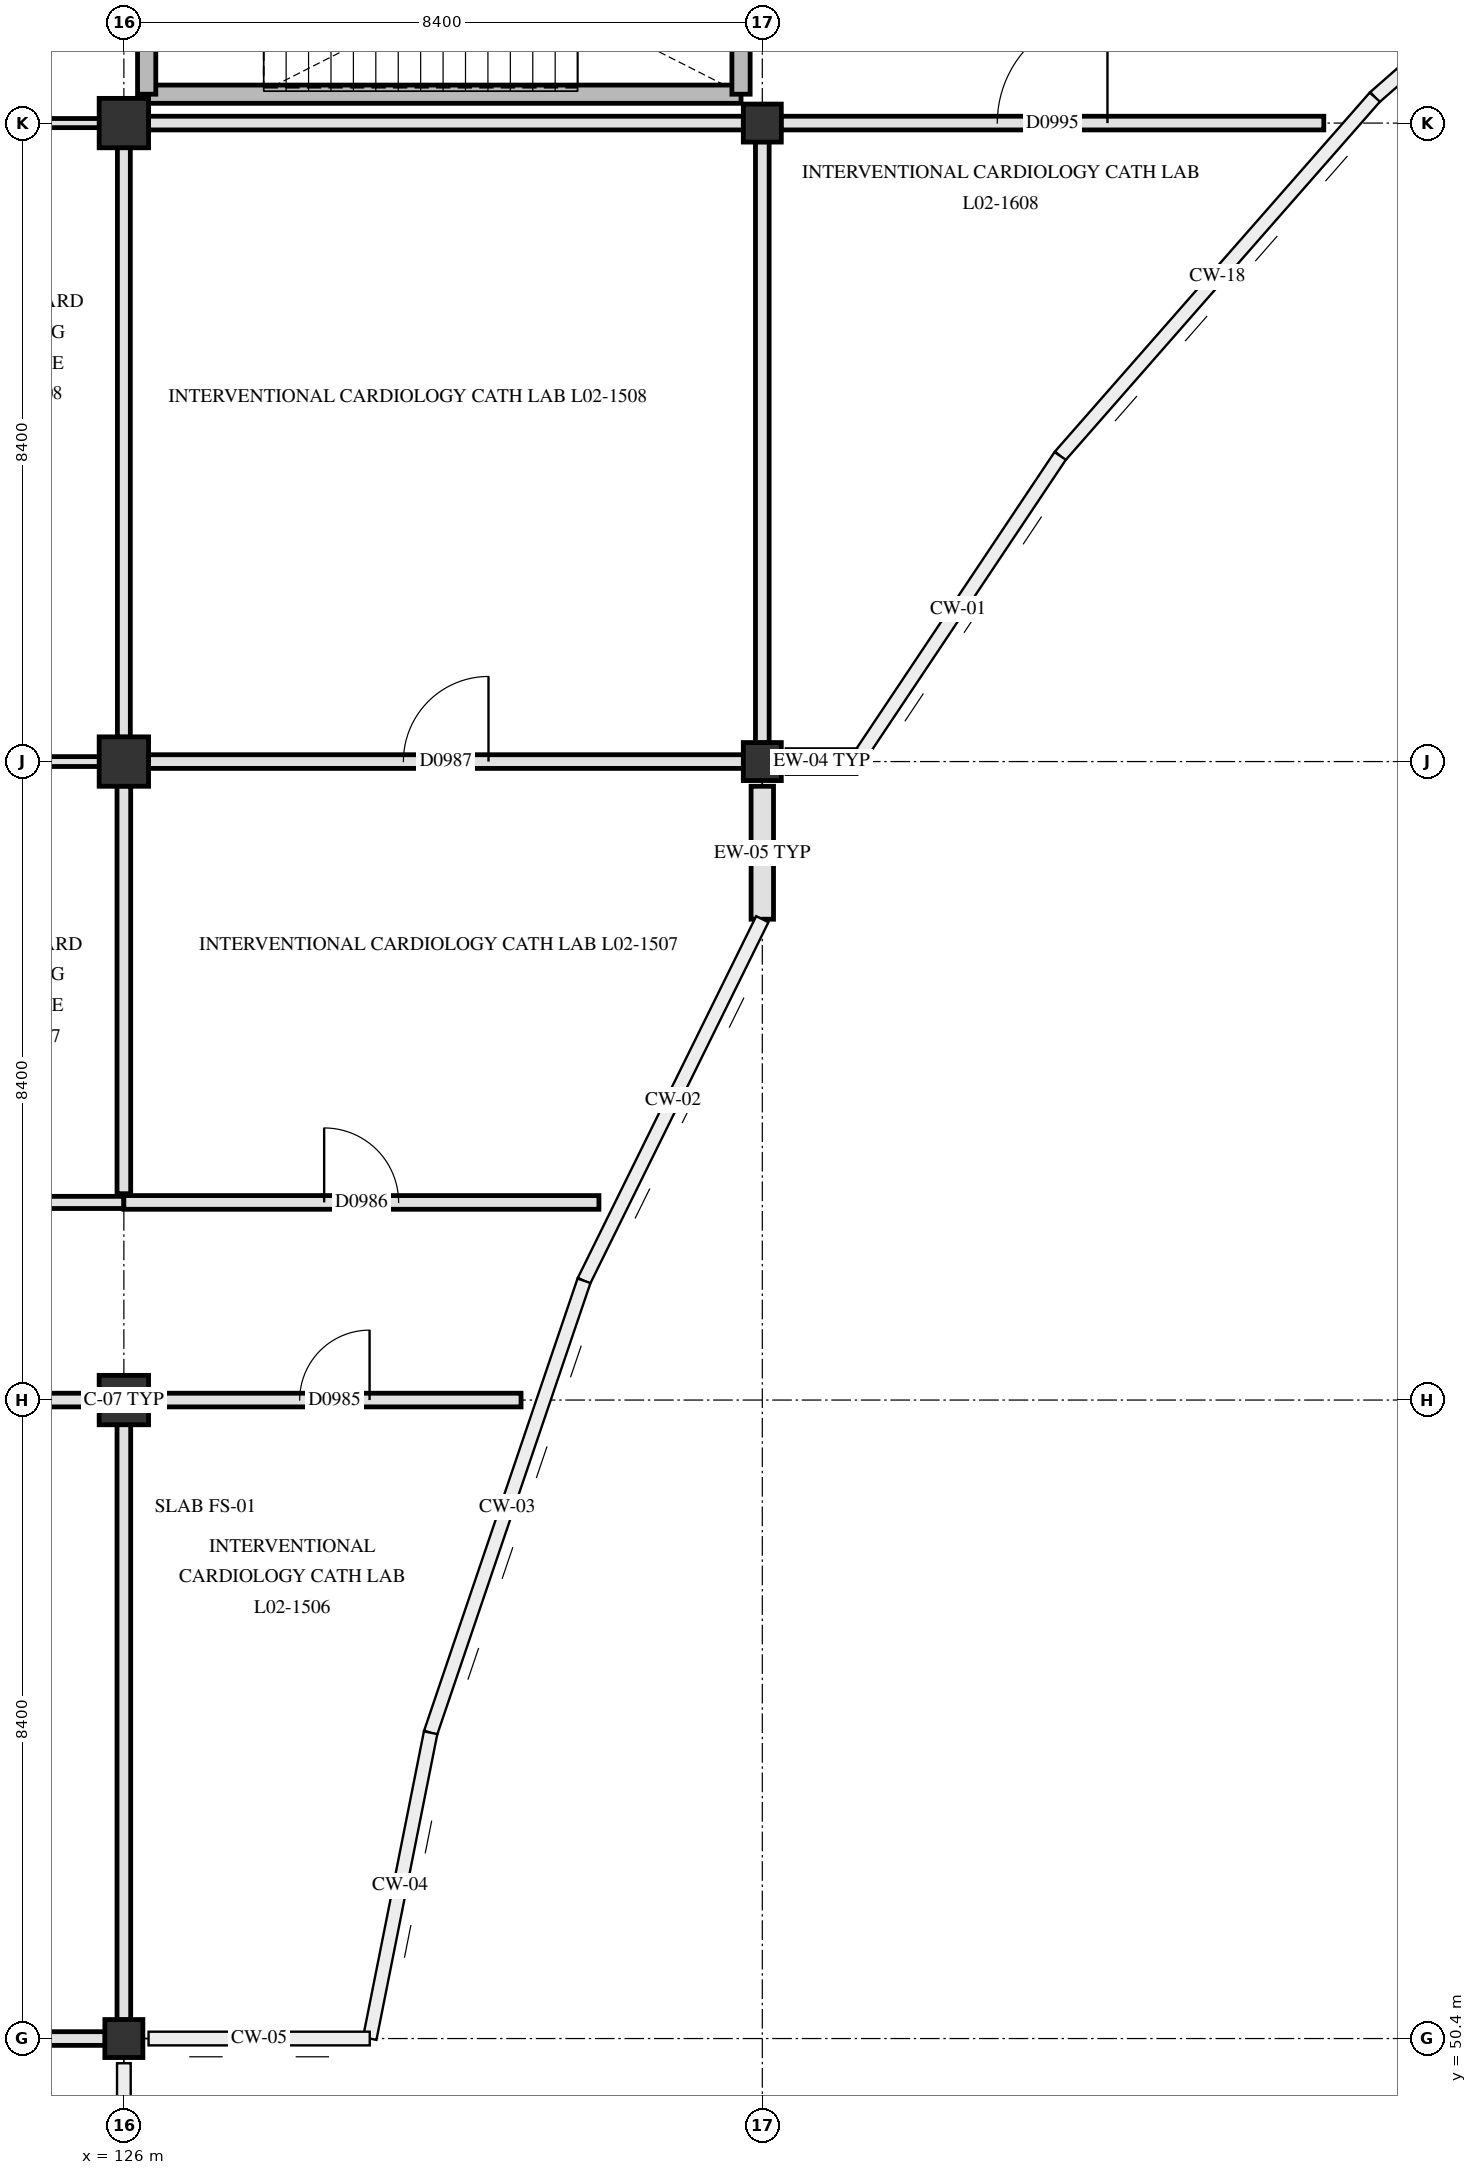
"""IFC4 building model, lengths in metres.
Left out: names, types, materials, properties, quantities, classifications, styles, units other than length and angle.
Written with IfcOpenShell. Run it as: python <this file> out.ifc"""

import sys

from ifc_helpers import new_model, si_unit, direction, frame, frame_2d, origin, origin_2d, place, context, subcontext, project, spatial, rectangle, circle, extrude, element, fill, save


model = new_model("IFC4")
c1 = context("Model", 3, precision=1e-05, world=origin(), true_north=direction((0.0, 1.0)))
c2 = subcontext(c1, "Body", "Model", "MODEL_VIEW")
j1 = project(units=[si_unit("LENGTHUNIT", "METRE"), si_unit("PLANEANGLEUNIT", "RADIAN")], contexts=[c1])
p1 = place(None, origin())
s1 = spatial("IfcSite", under=j1, at=p1, CompositionType="ELEMENT")
p2 = place(p1, origin())
s2 = spatial("IfcBuilding", under=s1, at=p2, CompositionType="ELEMENT")
p3 = place(p2, frame((0.0, 0.0, 9.3)))
s3 = spatial("IfcBuildingStorey", under=s2, at=p3, CompositionType="ELEMENT", Elevation=9.3)
p4 = place(p3, frame((126.0, 50.4, 0.0), z_axis=(0.0, 0.0, 1.0), x_axis=(1.0, 0.0, 0.0)))
e1 = element("IfcColumn", 1, at=p4, inside=s3, PredefinedType="COLUMN", context=c2, shape_type="SweptSolid", body=[
    extrude(rectangle(XDim=0.5, YDim=0.5, at=origin_2d()), origin(), (0.0, 0.0, 1.0), 5.1),
])
for number, where, z_axis, x_axis in (
    (2, (126.0, 58.8, 0.0), (0.0, 0.0, 1.0), (1.0, 0.0, 0.0)),
    (3, (126.0, 67.2, 0.0), (0.0, 0.0, 1.0), (1.0, 0.0, 0.0)),
    (4, (126.0, 75.6, 0.0), (0.0, 0.0, 1.0), (1.0, 0.0, 0.0)),
):
    element("IfcColumn", number, at=place(p3, frame(where, z_axis=z_axis, x_axis=x_axis)), inside=s3, PredefinedType="COLUMN", context=c2, shape_type="SweptSolid", body=[
        extrude(circle(Radius=0.325, at=origin_2d()), origin(), (0.0, 0.0, 1.0), 5.1),
    ])
for number, where, z_axis, x_axis in (
    (5, (134.4, 67.2, 0.0), (0.0, 0.0, 1.0), (1.0, 0.0, 0.0)),
    (6, (134.4, 75.6, 0.0), (0.0, 0.0, 1.0), (1.0, 0.0, 0.0)),
):
    element("IfcColumn", number, at=place(p3, frame(where, z_axis=z_axis, x_axis=x_axis)), inside=s3, PredefinedType="COLUMN", context=c2, shape_type="SweptSolid", body=[
        extrude(rectangle(XDim=0.5, YDim=0.5, at=origin_2d()), origin(), (0.0, 0.0, 1.0), 5.1),
    ])
p5 = place(p3, frame((135.633, 67.2, 0.0), z_axis=(0.0, 0.0, 1.0), x_axis=(-1.0, 0.0, 0.0)))
e7 = element("IfcWall", 7, at=p5, inside=s3, PredefinedType="SOLIDWALL", context=c2, shape_type="SweptSolid", body=[
    extrude(rectangle(XDim=0.908, YDim=0.315, at=frame_2d((0.454, 0.0))), origin(), (0.0, 0.0, 1.0), 4.77),
])
p6 = place(p3, frame((134.4, 66.875, 0.0), z_axis=(0.0, 0.0, 1.0), x_axis=(0.0, -1.0, 0.0)))
e8 = element("IfcWall", 8, at=p6, inside=s3, PredefinedType="SOLIDWALL", context=c2, shape_type="SweptSolid", body=[
    extrude(rectangle(XDim=1.749, YDim=0.295, at=frame_2d((0.875, 0.0))), origin(), (0.0, 0.0, 1.0), 4.77),
])
p7 = place(p3, frame((126.3, 75.98, 0.0), z_axis=(0.0, 0.0, 1.0), x_axis=(1.0, 0.0, 0.0)))
e9 = element("IfcWall", 9, at=p7, inside=s3, PredefinedType="SHEAR", context=c2, shape_type="SweptSolid", body=[
    extrude(rectangle(XDim=7.82, YDim=0.24, at=frame_2d((3.91, 0.0))), origin(), (0.0, 0.0, 1.0), 4.78),
])
for number, where, z_axis, x_axis in (
    (10, (126.3, 75.98, 0.0), (0.0, 0.0, 1.0), (0.0, 1.0, 0.0)),
    (11, (134.12, 75.98, 0.0), (0.0, 0.0, 1.0), (0.0, 1.0, 0.0)),
):
    element("IfcWall", number, at=place(p3, frame(where, z_axis=z_axis, x_axis=x_axis)), inside=s3, PredefinedType="SHEAR", context=c2, shape_type="SweptSolid", body=[
        extrude(rectangle(XDim=3.32, YDim=0.24, at=frame_2d((1.66, 0.0))), origin(), (0.0, 0.0, 1.0), 4.78),
    ])
p8 = place(p3, frame((117.945, 50.4, 0.0), z_axis=(0.0, 0.0, 1.0), x_axis=(1.0, 0.0, 0.0)))
e12 = element("IfcWall", 12, at=p8, inside=s3, PredefinedType="PARTITIONING", context=c2, shape_type="SweptSolid", body=[
    extrude(rectangle(XDim=7.81, YDim=0.18, at=frame_2d((3.905, 0.0))), origin(), (0.0, 0.0, 1.0), 4.17),
])
p9 = place(p3, frame((117.92, 58.8, 0.0), z_axis=(0.0, 0.0, 1.0), x_axis=(1.0, 0.0, 0.0)))
e13 = element("IfcWall", 13, at=p9, inside=s3, PredefinedType="PARTITIONING", context=c2, shape_type="SweptSolid", body=[
    extrude(rectangle(XDim=7.76, YDim=0.18, at=frame_2d((3.88, 0.0))), origin(), (0.0, 0.0, 1.0), 4.17),
])
p10 = place(p9, frame((3.255, 0.0, 0.0)))
e14 = element("IfcOpeningElement", 14, at=p10, cuts=e13, PredefinedType="OPENING", context=c2, shape_type="SweptSolid", body=[
    extrude(rectangle(XDim=1.25, YDim=2.2, at=frame_2d((0.625, 1.1))), frame((0.0, 0.1, 0.0), z_axis=(0.0, -1.0, 0.0), x_axis=(1.0, 0.0, 0.0)), (0.0, 0.0, 1.0), 0.2),
])
p11 = place(p3, frame((126.32, 58.8, 0.0), z_axis=(0.0, 0.0, 1.0), x_axis=(1.0, 0.0, 0.0)))
e15 = element("IfcWall", 15, at=p11, inside=s3, PredefinedType="PARTITIONING", context=c2, shape_type="SweptSolid", body=[
    extrude(rectangle(XDim=4.906, YDim=0.18, at=frame_2d((2.453, 0.0))), origin(), (0.0, 0.0, 1.0), 4.77),
])
p12 = place(p11, frame((1.993, 0.0, 0.0)))
e16 = element("IfcOpeningElement", 16, at=p12, cuts=e15, PredefinedType="OPENING", context=c2, shape_type="SweptSolid", body=[
    extrude(rectangle(XDim=0.92, YDim=2.08, at=frame_2d((0.46, 1.04))), frame((0.0, 0.1, 0.0), z_axis=(0.0, -1.0, 0.0), x_axis=(1.0, 0.0, 0.0)), (0.0, 0.0, 1.0), 0.2),
])
p13 = place(p3, frame((121.075, 61.4, 0.0), z_axis=(0.0, 0.0, 1.0), x_axis=(1.0, 0.0, 0.0)))
e17 = element("IfcWall", 17, at=p13, inside=s3, PredefinedType="PARTITIONING", context=c2, shape_type="SweptSolid", body=[
    extrude(rectangle(XDim=4.925, YDim=0.16, at=frame_2d((2.462, 0.0))), origin(), (0.0, 0.0, 1.0), 4.17),
])
p14 = place(p13, frame((1.812, 0.0, 0.0)))
e18 = element("IfcOpeningElement", 18, at=p14, cuts=e17, PredefinedType="OPENING", context=c2, shape_type="SweptSolid", body=[
    extrude(rectangle(XDim=1.3, YDim=2.2, at=frame_2d((0.65, 1.1))), frame((0.0, 0.09, 0.0), z_axis=(0.0, -1.0, 0.0), x_axis=(1.0, 0.0, 0.0)), (0.0, 0.0, 1.0), 0.18),
])
p15 = place(p3, frame((126.0, 61.4, 0.0), z_axis=(0.0, 0.0, 1.0), x_axis=(1.0, 0.0, 0.0)))
e19 = element("IfcWall", 19, at=p15, inside=s3, PredefinedType="PARTITIONING", context=c2, shape_type="SweptSolid", body=[
    extrude(rectangle(XDim=6.25, YDim=0.18, at=frame_2d((3.125, 0.0))), origin(), (0.0, 0.0, 1.0), 4.17),
])
p16 = place(p15, frame((2.635, 0.0, 0.0)))
e20 = element("IfcOpeningElement", 20, at=p16, cuts=e19, PredefinedType="OPENING", context=c2, shape_type="SweptSolid", body=[
    extrude(rectangle(XDim=0.98, YDim=2.12, at=frame_2d((0.49, 1.06))), frame((0.0, 0.1, 0.0), z_axis=(0.0, -1.0, 0.0), x_axis=(1.0, 0.0, 0.0)), (0.0, 0.0, 1.0), 0.2),
])
p17 = place(p3, frame((124.1, 67.2, 0.0), z_axis=(0.0, 0.0, 1.0), x_axis=(1.0, 0.0, 0.0)))
e21 = element("IfcWall", 21, at=p17, inside=s3, PredefinedType="PARTITIONING", context=c2, shape_type="SweptSolid", body=[
    extrude(rectangle(XDim=1.58, YDim=0.13, at=frame_2d((0.79, 0.0))), origin(), (0.0, 0.0, 1.0), 4.77),
])
p18 = place(p3, frame((126.32, 67.2, 0.0), z_axis=(0.0, 0.0, 1.0), x_axis=(1.0, 0.0, 0.0)))
e22 = element("IfcWall", 22, at=p18, inside=s3, PredefinedType="PARTITIONING", context=c2, shape_type="SweptSolid", body=[
    extrude(rectangle(XDim=7.835, YDim=0.18, at=frame_2d((3.917, 0.0))), origin(), (0.0, 0.0, 1.0), 4.17),
])
p19 = place(p18, frame((3.357, 0.0, 0.0)))
e23 = element("IfcOpeningElement", 23, at=p19, cuts=e22, PredefinedType="OPENING", context=c2, shape_type="SweptSolid", body=[
    extrude(rectangle(XDim=1.12, YDim=2.18, at=frame_2d((0.56, 1.09))), frame((0.0, 0.1, 0.0), z_axis=(0.0, -1.0, 0.0), x_axis=(1.0, 0.0, 0.0)), (0.0, 0.0, 1.0), 0.2),
])
p20 = place(p3, frame((117.92, 75.6, 0.0), z_axis=(0.0, 0.0, 1.0), x_axis=(1.0, 0.0, 0.0)))
e24 = element("IfcWall", 24, at=p20, inside=s3, PredefinedType="PARTITIONING", context=c2, shape_type="SweptSolid", body=[
    extrude(rectangle(XDim=7.76, YDim=0.12, at=frame_2d((3.88, 0.0))), origin(), (0.0, 0.0, 1.0), 4.17),
])
p21 = place(p20, frame((3.14, 0.0, 0.0)))
e25 = element("IfcOpeningElement", 25, at=p21, cuts=e24, PredefinedType="OPENING", context=c2, shape_type="SweptSolid", body=[
    extrude(rectangle(XDim=1.48, YDim=2.22, at=frame_2d((0.74, 1.11))), frame((0.0, 0.07, 0.0), z_axis=(0.0, -1.0, 0.0), x_axis=(1.0, 0.0, 0.0)), (0.0, 0.0, 1.0), 0.14),
])
p22 = place(p3, frame((126.32, 75.6, 0.0), z_axis=(0.0, 0.0, 1.0), x_axis=(1.0, 0.0, 0.0)))
e26 = element("IfcWall", 26, at=p22, inside=s3, PredefinedType="PARTITIONING", context=c2, shape_type="SweptSolid", body=[
    extrude(rectangle(XDim=7.835, YDim=0.18, at=frame_2d((3.917, 0.0))), origin(), (0.0, 0.0, 1.0), 4.17),
])
p23 = place(p3, frame((134.645, 75.6, 0.0), z_axis=(0.0, 0.0, 1.0), x_axis=(1.0, 0.0, 0.0)))
e27 = element("IfcWall", 27, at=p23, inside=s3, PredefinedType="PARTITIONING", context=c2, shape_type="SweptSolid", body=[
    extrude(rectangle(XDim=7.143, YDim=0.18, at=frame_2d((3.571, 0.0))), origin(), (0.0, 0.0, 1.0), 4.77),
])
p24 = place(p23, frame((2.846, 0.0, 0.0)))
e28 = element("IfcOpeningElement", 28, at=p24, cuts=e27, PredefinedType="OPENING", context=c2, shape_type="SweptSolid", body=[
    extrude(rectangle(XDim=1.45, YDim=2.2, at=frame_2d((0.725, 1.1))), frame((0.0, 0.1, 0.0), z_axis=(0.0, -1.0, 0.0), x_axis=(1.0, 0.0, 0.0)), (0.0, 0.0, 1.0), 0.2),
])
p25 = place(p3, frame((126.0, 50.645, 0.0), z_axis=(0.0, 0.0, 1.0), x_axis=(0.0, 1.0, 0.0)))
e29 = element("IfcWall", 29, at=p25, inside=s3, PredefinedType="PARTITIONING", context=c2, shape_type="SweptSolid", body=[
    extrude(rectangle(XDim=7.835, YDim=0.18, at=frame_2d((3.917, 0.0))), origin(), (0.0, 0.0, 1.0), 4.17),
])
p26 = place(p3, frame((126.0, 61.515, 0.0), z_axis=(0.0, 0.0, 1.0), x_axis=(0.0, 1.0, 0.0)))
e30 = element("IfcWall", 30, at=p26, inside=s3, PredefinedType="PARTITIONING", context=c2, shape_type="SweptSolid", body=[
    extrude(rectangle(XDim=5.365, YDim=0.18, at=frame_2d((2.683, 0.0))), origin(), (0.0, 0.0, 1.0), 4.17),
])
p27 = place(p3, frame((126.0, 67.52, 0.0), z_axis=(0.0, 0.0, 1.0), x_axis=(0.0, 1.0, 0.0)))
e31 = element("IfcWall", 31, at=p27, inside=s3, PredefinedType="PARTITIONING", context=c2, shape_type="SweptSolid", body=[
    extrude(rectangle(XDim=7.76, YDim=0.17, at=frame_2d((3.88, 0.0))), origin(), (0.0, 0.0, 1.0), 4.17),
])
p28 = place(p3, frame((134.4, 67.445, 0.0), z_axis=(0.0, 0.0, 1.0), x_axis=(0.0, 1.0, 0.0)))
e32 = element("IfcWall", 32, at=p28, inside=s3, PredefinedType="PARTITIONING", context=c2, shape_type="SweptSolid", body=[
    extrude(rectangle(XDim=7.91, YDim=0.18, at=frame_2d((3.955, 0.0))), origin(), (0.0, 0.0, 1.0), 4.17),
])
p29 = place(p12, origin())
e33 = element("IfcDoor", 33, at=p29, inside=s3, OperationType="SINGLE_SWING_RIGHT", PredefinedType="DOOR", context=c2, shape_type="SweptSolid", body=[
    extrude(rectangle(XDim=0.92, YDim=2.08, at=frame_2d((0.46, 1.04))), frame((0.0, 0.025, 0.0), z_axis=(0.0, -1.0, 0.0), x_axis=(1.0, 0.0, 0.0)), (0.0, 0.0, 1.0), 0.05),
])
fill(e16, e33)
p30 = place(p16, origin())
e34 = element("IfcDoor", 34, at=p30, inside=s3, OperationType="SINGLE_SWING_LEFT", PredefinedType="DOOR", context=c2, shape_type="SweptSolid", body=[
    extrude(rectangle(XDim=0.98, YDim=2.12, at=frame_2d((0.49, 1.06))), frame((0.0, 0.025, 0.0), z_axis=(0.0, -1.0, 0.0), x_axis=(1.0, 0.0, 0.0)), (0.0, 0.0, 1.0), 0.05),
])
fill(e20, e34)
p31 = place(p19, origin())
e35 = element("IfcDoor", 35, at=p31, inside=s3, OperationType="SINGLE_SWING_RIGHT", PredefinedType="DOOR", context=c2, shape_type="SweptSolid", body=[
    extrude(rectangle(XDim=1.12, YDim=2.18, at=frame_2d((0.56, 1.09))), frame((0.0, 0.025, 0.0), z_axis=(0.0, -1.0, 0.0), x_axis=(1.0, 0.0, 0.0)), (0.0, 0.0, 1.0), 0.05),
])
fill(e23, e35)
p32 = place(p24, origin())
e36 = element("IfcDoor", 36, at=p32, inside=s3, OperationType="SINGLE_SWING_RIGHT", PredefinedType="DOOR", context=c2, shape_type="SweptSolid", body=[
    extrude(rectangle(XDim=1.45, YDim=2.2, at=frame_2d((0.725, 1.1))), frame((0.0, 0.025, 0.0), z_axis=(0.0, -1.0, 0.0), x_axis=(1.0, 0.0, 0.0)), (0.0, 0.0, 1.0), 0.05),
])
fill(e28, e36)
save(model, sys.argv[1])
